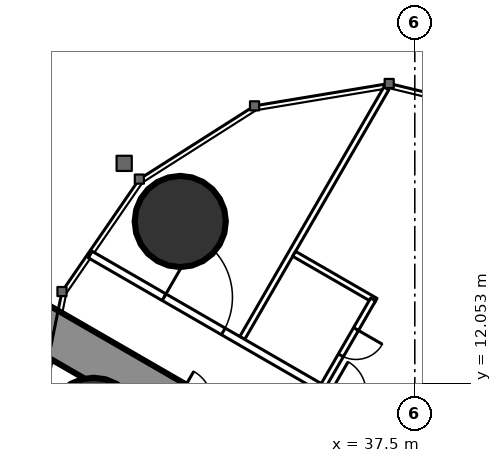
"""IFC4 building model, lengths in metres.
Left out: names, types, materials, properties, quantities, classifications, styles, units other than length and angle.
Written with IfcOpenShell. Run it as: python <this file> out.ifc"""

import sys

from ifc_helpers import new_model, si_unit, direction, frame, frame_2d, origin, origin_2d, place, context, subcontext, project, spatial, rectangle, circle, extrude, element, fill, save


model = new_model("IFC4")
c1 = context("Model", 3, precision=1e-05, world=origin(), true_north=direction((0.0, 1.0)))
c2 = subcontext(c1, "Body", "Model", "MODEL_VIEW")
j1 = project(units=[si_unit("LENGTHUNIT", "METRE"), si_unit("PLANEANGLEUNIT", "RADIAN")], contexts=[c1])
p1 = place(None, origin())
s1 = spatial("IfcSite", under=j1, at=p1, CompositionType="ELEMENT")
p2 = place(p1, origin())
s2 = spatial("IfcBuilding", under=s1, at=p2, CompositionType="ELEMENT")
p3 = place(p2, frame((0.0, 0.0, 215.3)))
s3 = spatial("IfcBuildingStorey", under=s2, at=p3, CompositionType="ELEMENT", Elevation=215.3)
for number, where, z_axis, x_axis in (
    (1, (31.328, 16.311, 0.0), (0.0, 0.0, 1.0), (1.0, 0.0, 0.0)),
    (2, (29.05, 11.0, 0.0), (0.0, 0.0, 1.0), (1.0, 0.0, 0.0)),
):
    element("IfcColumn", number, at=place(p3, frame(where, z_axis=z_axis, x_axis=x_axis)), inside=s3, PredefinedType="COLUMN", context=c2, shape_type="SweptSolid", body=[
        extrude(circle(Radius=1.2, at=origin_2d()), origin(), (0.0, 0.0, 1.0), 3.6),
    ])
p4 = place(p3, frame((27.2, 13.8, 0.0), z_axis=(0.0, 0.0, 1.0), x_axis=(0.866024515034, -0.500001539357, 0.0)))
e3 = element("IfcWall", 3, at=p4, inside=s3, PredefinedType="SHEAR", context=c2, shape_type="SweptSolid", body=[
    extrude(rectangle(XDim=26.907, YDim=1.2, at=frame_2d((13.454, 0.0))), origin(), (0.0, 0.0, 1.0), 3.6),
])
p5 = place(p4, frame((4.6, 0.0, 0.0)))
e4 = element("IfcOpeningElement", 4, at=p5, cuts=e3, PredefinedType="OPENING", context=c2, shape_type="SweptSolid", body=[
    extrude(rectangle(XDim=1.0, YDim=2.2, at=frame_2d((0.5, 1.1))), frame((0.0, 0.61, 0.0), z_axis=(0.0, -1.0, 0.0), x_axis=(1.0, 0.0, 0.0)), (0.0, 0.0, 1.0), 1.22),
])
p6 = place(p4, frame((13.395, 0.0, 0.0)))
e5 = element("IfcOpeningElement", 5, at=p6, cuts=e3, PredefinedType="OPENING", context=c2, shape_type="SweptSolid", body=[
    extrude(rectangle(XDim=1.8, YDim=2.2, at=frame_2d((0.9, 1.1))), frame((0.0, 0.61, 0.0), z_axis=(0.0, -1.0, 0.0), x_axis=(1.0, 0.0, 0.0)), (0.0, 0.0, 1.0), 1.22),
])
p7 = place(p3, frame((32.96, 13.246, 0.0), z_axis=(0.0, 0.0, 1.0), x_axis=(0.500000236886, 0.866025267018, 0.0)))
e6 = element("IfcWall", 6, at=p7, inside=s3, PredefinedType="PARTITIONING", context=c2, shape_type="SweptSolid", body=[
    extrude(rectangle(XDim=7.583, YDim=0.15, at=frame_2d((3.791, 0.0))), origin(), (0.0, 0.0, 1.0), 3.35),
])
p8 = place(p3, frame((28.959, 15.44, 0.0), z_axis=(0.0, 0.0, 1.0), x_axis=(0.866028936079, -0.499993881836, 0.0)))
e7 = element("IfcWall", 7, at=p8, inside=s3, PredefinedType="PARTITIONING", context=c2, shape_type="SweptSolid", body=[
    extrude(rectangle(XDim=20.503, YDim=0.2, at=frame_2d((10.251, 0.0))), origin(), (0.0, 0.0, 1.0), 3.35),
])
p9 = place(p8, frame((16.603, 0.0, 0.0)))
e8 = element("IfcOpeningElement", 8, at=p9, cuts=e7, PredefinedType="OPENING", context=c2, shape_type="SweptSolid", body=[
    extrude(rectangle(XDim=0.95, YDim=2.2, at=frame_2d((0.475, 1.1))), frame((0.0, 0.11, 0.0), z_axis=(0.0, -1.0, 0.0), x_axis=(1.0, 0.0, 0.0)), (0.0, 0.0, 1.0), 0.22),
])
p10 = place(p8, frame((7.287, 0.0, 0.0)))
e9 = element("IfcOpeningElement", 9, at=p10, cuts=e7, PredefinedType="OPENING", context=c2, shape_type="SweptSolid", body=[
    extrude(rectangle(XDim=0.95, YDim=2.2, at=frame_2d((0.475, 1.1))), frame((0.0, 0.11, 0.0), z_axis=(0.0, -1.0, 0.0), x_axis=(1.0, 0.0, 0.0)), (0.0, 0.0, 1.0), 0.22),
])
p11 = place(p8, frame((2.244, 0.0, 0.0)))
e10 = element("IfcOpeningElement", 10, at=p11, cuts=e7, PredefinedType="OPENING", context=c2, shape_type="SweptSolid", body=[
    extrude(rectangle(XDim=1.8, YDim=2.2, at=frame_2d((0.9, 1.1))), frame((0.0, 0.11, 0.0), z_axis=(0.0, -1.0, 0.0), x_axis=(1.0, 0.0, 0.0)), (0.0, 0.0, 1.0), 0.22),
])
p12 = place(p3, frame((34.325, 15.46, 0.0), z_axis=(0.0, 0.0, 1.0), x_axis=(0.866031185235, -0.4999899861, 0.0)))
e11 = element("IfcWall", 11, at=p12, inside=s3, PredefinedType="PARTITIONING", context=c2, shape_type="SweptSolid", body=[
    extrude(rectangle(XDim=2.475, YDim=0.15, at=frame_2d((1.238, 0.0))), origin(), (0.0, 0.0, 1.0), 3.35),
])
p13 = place(p3, frame((35.104, 12.008, 0.0), z_axis=(0.0, 0.0, 1.0), x_axis=(0.500047596559, 0.865997922154, 0.0)))
e12 = element("IfcWall", 12, at=p13, inside=s3, PredefinedType="PARTITIONING", context=c2, shape_type="SweptSolid", body=[
    extrude(rectangle(XDim=2.6, YDim=0.15, at=frame_2d((1.3, 0.0))), origin(), (0.0, 0.0, 1.0), 3.35),
])
p14 = place(p13, frame((0.9, 0.0, 0.0)))
e13 = element("IfcOpeningElement", 13, at=p14, cuts=e12, PredefinedType="OPENING", context=c2, shape_type="SweptSolid", body=[
    extrude(rectangle(XDim=0.8, YDim=2.2, at=frame_2d((0.4, 1.1))), frame((0.0, 0.085, 0.0), z_axis=(0.0, -1.0, 0.0), x_axis=(1.0, 0.0, 0.0)), (0.0, 0.0, 1.0), 0.17),
])
p15 = place(p14, origin())
e14 = element("IfcDoor", 14, at=p15, inside=s3, OperationType="SINGLE_SWING_RIGHT", PredefinedType="DOOR", context=c2, shape_type="SweptSolid", body=[
    extrude(rectangle(XDim=0.8, YDim=2.2, at=frame_2d((0.4, 1.1))), frame((0.0, 0.025, 0.0), z_axis=(0.0, -1.0, 0.0), x_axis=(1.0, 0.0, 0.0)), (0.0, 0.0, 1.0), 0.05),
])
fill(e13, e14)
p16 = place(p11, origin())
e15 = element("IfcDoor", 15, at=p16, inside=s3, OperationType="DOUBLE_DOOR_SINGLE_SWING", PredefinedType="DOOR", context=c2, shape_type="SweptSolid", body=[
    extrude(rectangle(XDim=1.8, YDim=2.2, at=frame_2d((0.9, 1.1))), frame((0.0, 0.025, 0.0), z_axis=(0.0, -1.0, 0.0), x_axis=(1.0, 0.0, 0.0)), (0.0, 0.0, 1.0), 0.05),
])
fill(e10, e15)
save(model, sys.argv[1])
